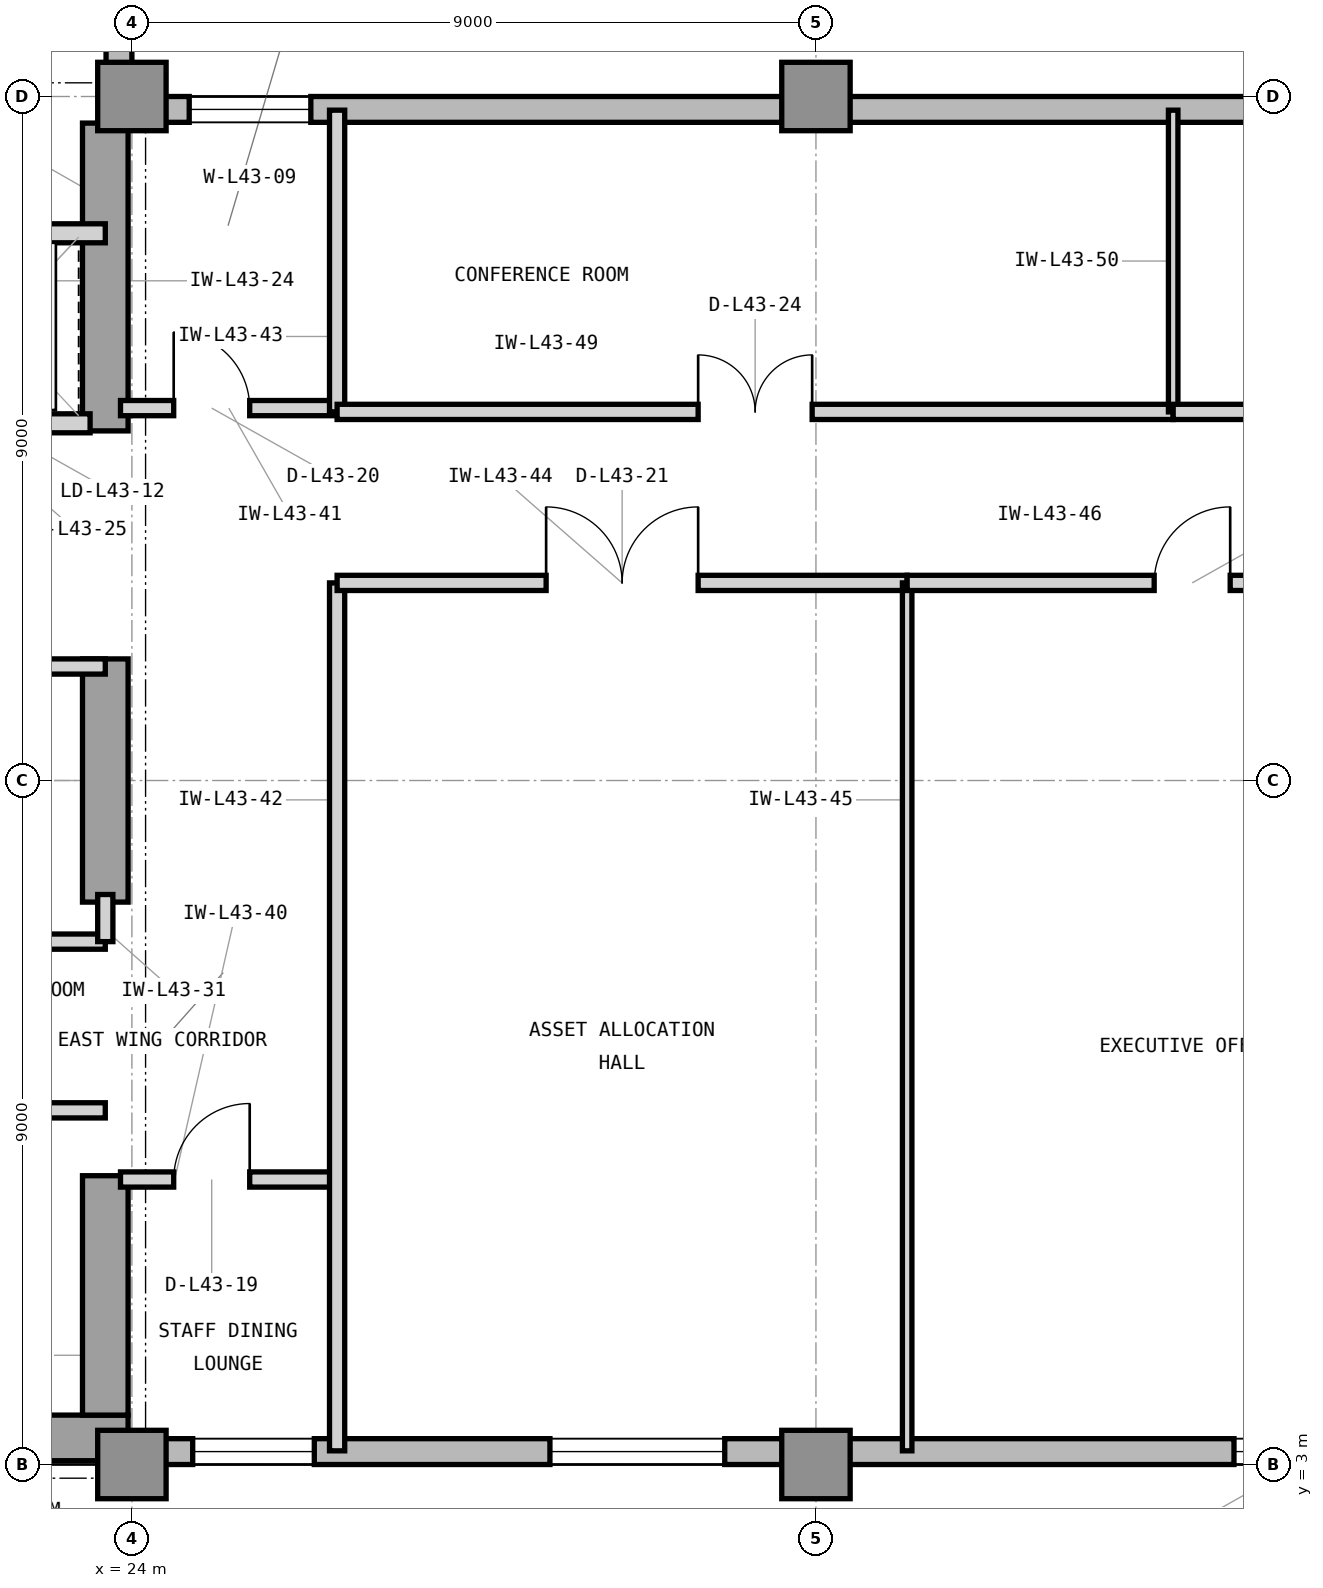
"""IFC4 building model, lengths in metres.
Left out: names, types, materials, properties, quantities, classifications, styles, units other than length and angle.
Written with IfcOpenShell. Run it as: python <this file> out.ifc"""

import sys

from ifc_helpers import new_model, si_unit, direction, frame, frame_2d, origin, origin_2d, place, context, subcontext, project, spatial, rectangle, extrude, element, fill, save


model = new_model("IFC4")
c1 = context("Model", 3, precision=1e-05, world=origin(), true_north=direction((0.0, 1.0)))
c2 = subcontext(c1, "Body", "Model", "MODEL_VIEW")
j1 = project(units=[si_unit("LENGTHUNIT", "METRE"), si_unit("PLANEANGLEUNIT", "RADIAN")], contexts=[c1])
p1 = place(None, origin())
s1 = spatial("IfcSite", under=j1, at=p1, CompositionType="ELEMENT")
p2 = place(p1, origin())
s2 = spatial("IfcBuilding", under=s1, at=p2, CompositionType="ELEMENT")
p3 = place(p2, frame((0.0, 0.0, 180.0)))
s3 = spatial("IfcBuildingStorey", under=s2, at=p3, CompositionType="ELEMENT", Elevation=180.0)
p4 = place(p3, frame((7.475, 3.35, 0.0), z_axis=(0.0, 0.0, 1.0), x_axis=(1.0, 0.0, 0.0)))
e1 = element("IfcWall", 1, at=p4, inside=s3, PredefinedType="SHEAR", context=c2, shape_type="SweptSolid", body=[
    extrude(rectangle(XDim=16.475, YDim=0.6, at=frame_2d((8.237, 0.0))), origin(), (0.0, 0.0, 1.0), 3.9),
])
p5 = place(p3, frame((23.65, 3.65, 0.0), z_axis=(0.0, 0.0, 1.0), x_axis=(0.0, 1.0, 0.0)))
e2 = element("IfcWall", 2, at=p5, inside=s3, PredefinedType="SHEAR", context=c2, shape_type="SweptSolid", body=[
    extrude(rectangle(XDim=3.15, YDim=0.6, at=frame_2d((1.575, 0.0))), origin(), (0.0, 0.0, 1.0), 3.9),
])
p6 = place(p3, frame((23.65, 10.4, 0.0), z_axis=(0.0, 0.0, 1.0), x_axis=(0.0, 1.0, 0.0)))
e3 = element("IfcWall", 3, at=p6, inside=s3, PredefinedType="SHEAR", context=c2, shape_type="SweptSolid", body=[
    extrude(rectangle(XDim=3.2, YDim=0.6, at=frame_2d((1.6, 0.0))), origin(), (0.0, 0.0, 1.0), 3.9),
])
p7 = place(p3, frame((23.65, 16.6, 0.0), z_axis=(0.0, 0.0, 1.0), x_axis=(0.0, 1.0, 0.0)))
e4 = element("IfcWall", 4, at=p7, inside=s3, PredefinedType="SHEAR", context=c2, shape_type="SweptSolid", body=[
    extrude(rectangle(XDim=4.05, YDim=0.6, at=frame_2d((2.025, 0.0))), origin(), (0.0, 0.0, 1.0), 3.9),
])
for number, where, z_axis, x_axis in (
    (5, (24.0, 3.0, 0.0), (0.0, 0.0, 1.0), (1.0, 0.0, 0.0)),
    (6, (24.0, 21.0, 0.0), (0.0, 0.0, 1.0), (1.0, 0.0, 0.0)),
    (7, (33.0, 3.0, 0.0), (0.0, 0.0, 1.0), (1.0, 0.0, 0.0)),
    (8, (33.0, 21.0, 0.0), (0.0, 0.0, 1.0), (1.0, 0.0, 0.0)),
):
    element("IfcColumn", number, at=place(p3, frame(where, z_axis=z_axis, x_axis=x_axis)), inside=s3, PredefinedType="COLUMN", context=c2, shape_type="SweptSolid", body=[
        extrude(rectangle(XDim=0.9, YDim=0.9, at=origin_2d()), origin(), (0.0, 0.0, 1.0), 3.9),
    ])
p8 = place(p3, frame((23.9, 3.17, 0.0), z_axis=(0.0, 0.0, 1.0), x_axis=(1.0, 0.0, 0.0)))
e9 = element("IfcWall", 9, at=p8, inside=s3, PredefinedType="STANDARD", context=c2, shape_type="SweptSolid", body=[
    extrude(rectangle(XDim=31.5, YDim=0.34, at=frame_2d((15.75, 0.0))), origin(), (0.0, 0.0, 1.0), 3.7),
])
p9 = place(p8, frame((5.6, 0.0, 0.9)))
e10 = element("IfcOpeningElement", 10, at=p9, cuts=e9, PredefinedType="OPENING", context=c2, shape_type="SweptSolid", body=[
    extrude(rectangle(XDim=2.3, YDim=2.2, at=frame_2d((1.15, 1.1))), frame((0.0, 0.18, 0.0), z_axis=(0.0, -1.0, 0.0), x_axis=(1.0, 0.0, 0.0)), (0.0, 0.0, 1.0), 0.36),
])
p10 = place(p8, frame((14.6, 0.0, 0.9)))
e11 = element("IfcOpeningElement", 11, at=p10, cuts=e9, PredefinedType="OPENING", context=c2, shape_type="SweptSolid", body=[
    extrude(rectangle(XDim=2.3, YDim=2.2, at=frame_2d((1.15, 1.1))), frame((0.0, 0.18, 0.0), z_axis=(0.0, -1.0, 0.0), x_axis=(1.0, 0.0, 0.0)), (0.0, 0.0, 1.0), 0.36),
])
p11 = place(p8, frame((19.1, 0.0, 0.9)))
e12 = element("IfcOpeningElement", 12, at=p11, cuts=e9, PredefinedType="OPENING", context=c2, shape_type="SweptSolid", body=[
    extrude(rectangle(XDim=2.3, YDim=2.2, at=frame_2d((1.15, 1.1))), frame((0.0, 0.18, 0.0), z_axis=(0.0, -1.0, 0.0), x_axis=(1.0, 0.0, 0.0)), (0.0, 0.0, 1.0), 0.36),
])
p12 = place(p8, frame((0.9, 0.0, 0.9)))
e13 = element("IfcOpeningElement", 13, at=p12, cuts=e9, PredefinedType="OPENING", context=c2, shape_type="SweptSolid", body=[
    extrude(rectangle(XDim=1.6, YDim=2.2, at=frame_2d((0.8, 1.1))), frame((0.0, 0.18, 0.0), z_axis=(0.0, -1.0, 0.0), x_axis=(1.0, 0.0, 0.0)), (0.0, 0.0, 1.0), 0.36),
])
p13 = place(p3, frame((55.4, 20.83, 0.0), z_axis=(0.0, 0.0, 1.0), x_axis=(-1.0, 0.0, 0.0)))
e14 = element("IfcWall", 14, at=p13, inside=s3, PredefinedType="STANDARD", context=c2, shape_type="SweptSolid", body=[
    extrude(rectangle(XDim=31.4, YDim=0.34, at=frame_2d((15.7, 0.0))), origin(), (0.0, 0.0, 1.0), 3.7),
])
p14 = place(p13, frame((29.046, 0.0, 0.9)))
e15 = element("IfcOpeningElement", 15, at=p14, cuts=e14, PredefinedType="OPENING", context=c2, shape_type="SweptSolid", body=[
    extrude(rectangle(XDim=1.6, YDim=2.2, at=frame_2d((0.8, 1.1))), frame((0.0, 0.18, 0.0), z_axis=(0.0, -1.0, 0.0), x_axis=(1.0, 0.0, 0.0)), (0.0, 0.0, 1.0), 0.36),
])
p15 = place(p13, frame((10.125, 0.0, 0.9)))
e16 = element("IfcOpeningElement", 16, at=p15, cuts=e14, PredefinedType="OPENING", context=c2, shape_type="SweptSolid", body=[
    extrude(rectangle(XDim=2.3, YDim=2.2, at=frame_2d((1.15, 1.1))), frame((0.0, 0.18, 0.0), z_axis=(0.0, -1.0, 0.0), x_axis=(1.0, 0.0, 0.0)), (0.0, 0.0, 1.0), 0.36),
])
p16 = place(p3, frame((23.83, 21.0, 0.0), z_axis=(0.0, 0.0, 1.0), x_axis=(0.0, 1.0, 0.0)))
e17 = element("IfcWall", 17, at=p16, inside=s3, PredefinedType="STANDARD", context=c2, shape_type="SweptSolid", body=[
    extrude(rectangle(XDim=22.4, YDim=0.34, at=frame_2d((11.2, 0.0))), origin(), (0.0, 0.0, 1.0), 3.7),
])
p17 = place(p16, frame((10.955, 0.0, 0.9)))
e18 = element("IfcOpeningElement", 18, at=p17, cuts=e17, PredefinedType="OPENING", context=c2, shape_type="SweptSolid", body=[
    extrude(rectangle(XDim=2.3, YDim=2.2, at=frame_2d((1.15, 1.1))), frame((0.0, 0.18, 0.0), z_axis=(0.0, -1.0, 0.0), x_axis=(1.0, 0.0, 0.0)), (0.0, 0.0, 1.0), 0.36),
])
p18 = place(p3, frame((21.05, 16.7, 0.0), z_axis=(0.0, 0.0, 1.0), x_axis=(1.0, 0.0, 0.0)))
e19 = element("IfcWall", 19, at=p18, inside=s3, PredefinedType="PARTITIONING", context=c2, shape_type="SweptSolid", body=[
    extrude(rectangle(XDim=2.4, YDim=0.25, at=frame_2d((1.2, 0.0))), origin(), (0.0, 0.0, 1.0), 3.283),
])
p19 = place(p18, frame((0.52, 0.0, 0.0)))
e20 = element("IfcOpeningElement", 20, at=p19, cuts=e19, PredefinedType="OPENING", context=c2, shape_type="SweptSolid", body=[
    extrude(rectangle(XDim=1.15, YDim=2.25, at=frame_2d((0.575, 1.125))), frame((0.0, 0.135, 0.0), z_axis=(0.0, -1.0, 0.0), x_axis=(1.0, 0.0, 0.0)), (0.0, 0.0, 1.0), 0.27),
])
p20 = place(p3, frame((16.45, 19.2, 0.0), z_axis=(0.0, 0.0, 1.0), x_axis=(1.0, 0.0, 0.0)))
e21 = element("IfcWall", 21, at=p20, inside=s3, PredefinedType="PARTITIONING", context=c2, shape_type="SweptSolid", body=[
    extrude(rectangle(XDim=7.2, YDim=0.25, at=frame_2d((3.6, 0.0))), origin(), (0.0, 0.0, 1.0), 3.69),
])
p21 = place(p3, frame((20.85, 7.66, 0.0), z_axis=(0.0, 0.0, 1.0), x_axis=(1.0, 0.0, 0.0)))
e22 = element("IfcWall", 22, at=p21, inside=s3, PredefinedType="PARTITIONING", context=c2, shape_type="SweptSolid", body=[
    extrude(rectangle(XDim=2.8, YDim=0.2, at=frame_2d((1.4, 0.0))), origin(), (0.0, 0.0, 1.0), 3.69),
])
p22 = place(p21, frame((0.95, 0.0, 0.0)))
e23 = element("IfcOpeningElement", 23, at=p22, cuts=e22, PredefinedType="OPENING", context=c2, shape_type="SweptSolid", body=[
    extrude(rectangle(XDim=0.9, YDim=2.1, at=frame_2d((0.45, 1.05))), frame((0.0, 0.11, 0.0), z_axis=(0.0, -1.0, 0.0), x_axis=(1.0, 0.0, 0.0)), (0.0, 0.0, 1.0), 0.22),
])
p23 = place(p3, frame((14.825, 9.88, 0.0), z_axis=(0.0, 0.0, 1.0), x_axis=(1.0, 0.0, 0.0)))
e24 = element("IfcWall", 24, at=p23, inside=s3, PredefinedType="PARTITIONING", context=c2, shape_type="SweptSolid", body=[
    extrude(rectangle(XDim=8.825, YDim=0.2, at=frame_2d((4.413, 0.0))), origin(), (0.0, 0.0, 1.0), 3.69),
])
p24 = place(p3, frame((23.65, 9.88, 0.0), z_axis=(0.0, 0.0, 1.0), x_axis=(0.0, 1.0, 0.0)))
e25 = element("IfcWall", 25, at=p24, inside=s3, PredefinedType="PARTITIONING", context=c2, shape_type="SweptSolid", body=[
    extrude(rectangle(XDim=0.62, YDim=0.2, at=frame_2d((0.31, 0.0))), origin(), (0.0, 0.0, 1.0), 3.69),
])
p25 = place(p3, frame((19.9, 13.5, 0.0), z_axis=(0.0, 0.0, 1.0), x_axis=(1.0, 0.0, 0.0)))
e26 = element("IfcWall", 26, at=p25, inside=s3, PredefinedType="PARTITIONING", context=c2, shape_type="SweptSolid", body=[
    extrude(rectangle(XDim=3.75, YDim=0.2, at=frame_2d((1.875, 0.0))), origin(), (0.0, 0.0, 1.0), 3.283),
])
p26 = place(p25, frame((1.4, 0.0, 0.0)))
e27 = element("IfcOpeningElement", 27, at=p26, cuts=e26, PredefinedType="OPENING", context=c2, shape_type="SweptSolid", body=[
    extrude(rectangle(XDim=0.95, YDim=2.1, at=frame_2d((0.475, 1.05))), frame((0.0, 0.11, 0.0), z_axis=(0.0, -1.0, 0.0), x_axis=(1.0, 0.0, 0.0)), (0.0, 0.0, 1.0), 0.22),
])
p27 = place(p3, frame((23.85, 6.75, 0.0), z_axis=(0.0, 0.0, 1.0), x_axis=(1.0, 0.0, 0.0)))
e28 = element("IfcWall", 28, at=p27, inside=s3, PredefinedType="PARTITIONING", context=c2, shape_type="SweptSolid", body=[
    extrude(rectangle(XDim=2.85, YDim=0.2, at=frame_2d((1.425, 0.0))), origin(), (0.0, 0.0, 1.0), 3.69),
])
p28 = place(p27, frame((0.7, 0.0, 0.0)))
e29 = element("IfcOpeningElement", 29, at=p28, cuts=e28, PredefinedType="OPENING", context=c2, shape_type="SweptSolid", body=[
    extrude(rectangle(XDim=1.0, YDim=2.15, at=frame_2d((0.5, 1.075))), frame((0.0, 0.11, 0.0), z_axis=(0.0, -1.0, 0.0), x_axis=(1.0, 0.0, 0.0)), (0.0, 0.0, 1.0), 0.22),
])
p29 = place(p3, frame((23.85, 16.9, 0.0), z_axis=(0.0, 0.0, 1.0), x_axis=(1.0, 0.0, 0.0)))
e30 = element("IfcWall", 30, at=p29, inside=s3, PredefinedType="PARTITIONING", context=c2, shape_type="SweptSolid", body=[
    extrude(rectangle(XDim=2.85, YDim=0.2, at=frame_2d((1.425, 0.0))), origin(), (0.0, 0.0, 1.0), 3.69),
])
p30 = place(p29, frame((0.7, 0.0, 0.0)))
e31 = element("IfcOpeningElement", 31, at=p30, cuts=e30, PredefinedType="OPENING", context=c2, shape_type="SweptSolid", body=[
    extrude(rectangle(XDim=1.0, YDim=2.15, at=frame_2d((0.5, 1.075))), frame((0.0, 0.11, 0.0), z_axis=(0.0, -1.0, 0.0), x_axis=(1.0, 0.0, 0.0)), (0.0, 0.0, 1.0), 0.22),
])
p31 = place(p3, frame((26.7, 3.18, 0.0), z_axis=(0.0, 0.0, 1.0), x_axis=(0.0, 1.0, 0.0)))
e32 = element("IfcWall", 32, at=p31, inside=s3, PredefinedType="PARTITIONING", context=c2, shape_type="SweptSolid", body=[
    extrude(rectangle(XDim=11.42, YDim=0.2, at=frame_2d((5.71, 0.0))), origin(), (0.0, 0.0, 1.0), 3.69),
])
p32 = place(p3, frame((26.7, 16.85, 0.0), z_axis=(0.0, 0.0, 1.0), x_axis=(0.0, 1.0, 0.0)))
e33 = element("IfcWall", 33, at=p32, inside=s3, PredefinedType="PARTITIONING", context=c2, shape_type="SweptSolid", body=[
    extrude(rectangle(XDim=3.97, YDim=0.2, at=frame_2d((1.985, 0.0))), origin(), (0.0, 0.0, 1.0), 3.69),
])
p33 = place(p3, frame((26.7, 14.6, 0.0), z_axis=(0.0, 0.0, 1.0), x_axis=(1.0, 0.0, 0.0)))
e34 = element("IfcWall", 34, at=p33, inside=s3, PredefinedType="PARTITIONING", context=c2, shape_type="SweptSolid", body=[
    extrude(rectangle(XDim=7.5, YDim=0.2, at=frame_2d((3.75, 0.0))), origin(), (0.0, 0.0, 1.0), 3.69),
])
p34 = place(p33, frame((2.75, 0.0, 0.0)))
e35 = element("IfcOpeningElement", 35, at=p34, cuts=e34, PredefinedType="OPENING", context=c2, shape_type="SweptSolid", body=[
    extrude(rectangle(XDim=2.0, YDim=2.5, at=frame_2d((1.0, 1.25))), frame((0.0, 0.11, 0.0), z_axis=(0.0, -1.0, 0.0), x_axis=(1.0, 0.0, 0.0)), (0.0, 0.0, 1.0), 0.22),
])
p35 = place(p3, frame((34.2, 3.18, 0.0), z_axis=(0.0, 0.0, 1.0), x_axis=(0.0, 1.0, 0.0)))
e36 = element("IfcWall", 36, at=p35, inside=s3, PredefinedType="PARTITIONING", context=c2, shape_type="SweptSolid", body=[
    extrude(rectangle(XDim=11.42, YDim=0.125, at=frame_2d((5.71, 0.0))), origin(), (0.0, 0.0, 1.0), 3.69),
])
p36 = place(p3, frame((34.2, 14.6, 0.0), z_axis=(0.0, 0.0, 1.0), x_axis=(1.0, 0.0, 0.0)))
e37 = element("IfcWall", 37, at=p36, inside=s3, PredefinedType="PARTITIONING", context=c2, shape_type="SweptSolid", body=[
    extrude(rectangle(XDim=7.5, YDim=0.2, at=frame_2d((3.75, 0.0))), origin(), (0.0, 0.0, 1.0), 3.69),
])
p37 = place(p36, frame((3.25, 0.0, 0.0)))
e38 = element("IfcOpeningElement", 38, at=p37, cuts=e37, PredefinedType="OPENING", context=c2, shape_type="SweptSolid", body=[
    extrude(rectangle(XDim=1.0, YDim=2.15, at=frame_2d((0.5, 1.075))), frame((0.0, 0.11, 0.0), z_axis=(0.0, -1.0, 0.0), x_axis=(1.0, 0.0, 0.0)), (0.0, 0.0, 1.0), 0.22),
])
p38 = place(p3, frame((26.7, 16.85, 0.0), z_axis=(0.0, 0.0, 1.0), x_axis=(1.0, 0.0, 0.0)))
e39 = element("IfcWall", 39, at=p38, inside=s3, PredefinedType="PARTITIONING", context=c2, shape_type="SweptSolid", body=[
    extrude(rectangle(XDim=11.0, YDim=0.2, at=frame_2d((5.5, 0.0))), origin(), (0.0, 0.0, 1.0), 3.69),
])
p39 = place(p38, frame((4.75, 0.0, 0.0)))
e40 = element("IfcOpeningElement", 40, at=p39, cuts=e39, PredefinedType="OPENING", context=c2, shape_type="SweptSolid", body=[
    extrude(rectangle(XDim=1.5, YDim=2.3, at=frame_2d((0.75, 1.15))), frame((0.0, 0.11, 0.0), z_axis=(0.0, -1.0, 0.0), x_axis=(1.0, 0.0, 0.0)), (0.0, 0.0, 1.0), 0.22),
])
p40 = place(p3, frame((37.7, 16.85, 0.0), z_axis=(0.0, 0.0, 1.0), x_axis=(0.0, 1.0, 0.0)))
e41 = element("IfcWall", 41, at=p40, inside=s3, PredefinedType="PARTITIONING", context=c2, shape_type="SweptSolid", body=[
    extrude(rectangle(XDim=3.97, YDim=0.125, at=frame_2d((1.985, 0.0))), origin(), (0.0, 0.0, 1.0), 3.69),
])
p41 = place(p3, frame((37.7, 16.85, 0.0), z_axis=(0.0, 0.0, 1.0), x_axis=(1.0, 0.0, 0.0)))
e42 = element("IfcWall", 42, at=p41, inside=s3, PredefinedType="PARTITIONING", context=c2, shape_type="SweptSolid", body=[
    extrude(rectangle(XDim=10.3, YDim=0.2, at=frame_2d((5.15, 0.0))), origin(), (0.0, 0.0, 1.0), 3.69),
])
p42 = place(p41, frame((4.65, 0.0, 0.0)))
e43 = element("IfcOpeningElement", 43, at=p42, cuts=e42, PredefinedType="OPENING", context=c2, shape_type="SweptSolid", body=[
    extrude(rectangle(XDim=1.0, YDim=2.15, at=frame_2d((0.5, 1.075))), frame((0.0, 0.11, 0.0), z_axis=(0.0, -1.0, 0.0), x_axis=(1.0, 0.0, 0.0)), (0.0, 0.0, 1.0), 0.22),
])
p43 = place(p9, origin())
e44 = element("IfcWindow", 44, at=p43, inside=s3, PartitioningType="SINGLE_PANEL", PredefinedType="WINDOW", context=c2, shape_type="SweptSolid", body=[
    extrude(rectangle(XDim=2.3, YDim=2.2, at=frame_2d((1.15, 1.1))), frame((0.0, 0.11, 0.0), z_axis=(0.0, -1.0, 0.0), x_axis=(1.0, 0.0, 0.0)), (0.0, 0.0, 1.0), 0.06),
])
fill(e10, e44)
p44 = place(p10, origin())
e45 = element("IfcWindow", 45, at=p44, inside=s3, PartitioningType="SINGLE_PANEL", PredefinedType="WINDOW", context=c2, shape_type="SweptSolid", body=[
    extrude(rectangle(XDim=2.3, YDim=2.2, at=frame_2d((1.15, 1.1))), frame((0.0, 0.11, 0.0), z_axis=(0.0, -1.0, 0.0), x_axis=(1.0, 0.0, 0.0)), (0.0, 0.0, 1.0), 0.06),
])
fill(e11, e45)
p45 = place(p28, origin())
e46 = element("IfcDoor", 46, at=p45, inside=s3, OperationType="SINGLE_SWING_RIGHT", PredefinedType="DOOR", context=c2, shape_type="SweptSolid", body=[
    extrude(rectangle(XDim=1.0, YDim=2.15, at=frame_2d((0.5, 1.075))), frame((0.0, 0.025, 0.0), z_axis=(0.0, -1.0, 0.0), x_axis=(1.0, 0.0, 0.0)), (0.0, 0.0, 1.0), 0.05),
])
fill(e29, e46)
p46 = place(p30, origin())
e47 = element("IfcDoor", 47, at=p46, inside=s3, OperationType="SINGLE_SWING_LEFT", PredefinedType="DOOR", context=c2, shape_type="SweptSolid", body=[
    extrude(rectangle(XDim=1.0, YDim=2.15, at=frame_2d((0.5, 1.075))), frame((0.0, 0.025, 0.0), z_axis=(0.0, -1.0, 0.0), x_axis=(1.0, 0.0, 0.0)), (0.0, 0.0, 1.0), 0.05),
])
fill(e31, e47)
p47 = place(p34, origin())
e48 = element("IfcDoor", 48, at=p47, inside=s3, OperationType="DOUBLE_DOOR_SINGLE_SWING", PredefinedType="DOOR", context=c2, shape_type="SweptSolid", body=[
    extrude(rectangle(XDim=2.0, YDim=2.5, at=frame_2d((1.0, 1.25))), frame((0.0, 0.025, 0.0), z_axis=(0.0, -1.0, 0.0), x_axis=(1.0, 0.0, 0.0)), (0.0, 0.0, 1.0), 0.05),
])
fill(e35, e48)
p48 = place(p37, origin())
e49 = element("IfcDoor", 49, at=p48, inside=s3, OperationType="SINGLE_SWING_RIGHT", PredefinedType="DOOR", context=c2, shape_type="SweptSolid", body=[
    extrude(rectangle(XDim=1.0, YDim=2.15, at=frame_2d((0.5, 1.075))), frame((0.0, 0.025, 0.0), z_axis=(0.0, -1.0, 0.0), x_axis=(1.0, 0.0, 0.0)), (0.0, 0.0, 1.0), 0.05),
])
fill(e38, e49)
p49 = place(p39, origin())
e50 = element("IfcDoor", 50, at=p49, inside=s3, OperationType="DOUBLE_DOOR_SINGLE_SWING", PredefinedType="DOOR", context=c2, shape_type="SweptSolid", body=[
    extrude(rectangle(XDim=1.5, YDim=2.3, at=frame_2d((0.75, 1.15))), frame((0.0, 0.025, 0.0), z_axis=(0.0, -1.0, 0.0), x_axis=(1.0, 0.0, 0.0)), (0.0, 0.0, 1.0), 0.05),
])
fill(e40, e50)
p50 = place(p12, origin())
e51 = element("IfcWindow", 51, at=p50, inside=s3, PartitioningType="SINGLE_PANEL", PredefinedType="WINDOW", context=c2, shape_type="SweptSolid", body=[
    extrude(rectangle(XDim=1.6, YDim=2.2, at=frame_2d((0.8, 1.1))), frame((0.0, 0.11, 0.0), z_axis=(0.0, -1.0, 0.0), x_axis=(1.0, 0.0, 0.0)), (0.0, 0.0, 1.0), 0.06),
])
fill(e13, e51)
p51 = place(p14, origin())
e52 = element("IfcWindow", 52, at=p51, inside=s3, PartitioningType="SINGLE_PANEL", PredefinedType="WINDOW", context=c2, shape_type="SweptSolid", body=[
    extrude(rectangle(XDim=1.6, YDim=2.2, at=frame_2d((0.8, 1.1))), frame((0.0, 0.11, 0.0), z_axis=(0.0, -1.0, 0.0), x_axis=(1.0, 0.0, 0.0)), (0.0, 0.0, 1.0), 0.06),
])
fill(e15, e52)
save(model, sys.argv[1])
